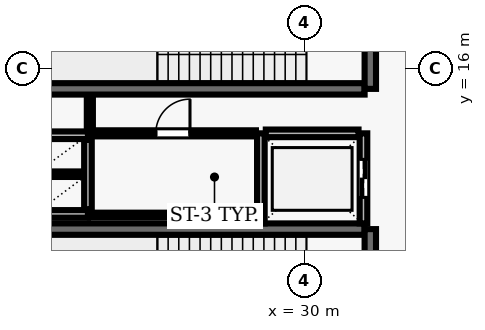
"""IFC4 building model, lengths in metres.
Left out: names, types, materials, properties, quantities, classifications, styles, units other than length and angle.
Written with IfcOpenShell. Run it as: python <this file> out.ifc"""

import sys

from ifc_helpers import new_model, si_unit, direction, frame, frame_2d, origin, place, context, subcontext, project, spatial, rectangle, extrude, element, fill, save


model = new_model("IFC4")
c1 = context("Model", 3, precision=1e-05, world=origin(), true_north=direction((0.0, 1.0)))
c2 = subcontext(c1, "Body", "Model", "MODEL_VIEW")
j1 = project(units=[si_unit("LENGTHUNIT", "METRE"), si_unit("PLANEANGLEUNIT", "RADIAN")], contexts=[c1])
p1 = place(None, origin())
s1 = spatial("IfcSite", under=j1, at=p1, CompositionType="ELEMENT")
p2 = place(p1, origin())
s2 = spatial("IfcBuilding", under=s1, at=p2, CompositionType="ELEMENT")
p3 = place(p2, origin())
s3 = spatial("IfcBuildingStorey", under=s2, at=p3, CompositionType="ELEMENT", Elevation=0.0)
p4 = place(p3, frame((23.22, 15.47, 0.0), z_axis=(0.0, 0.0, 1.0), x_axis=(1.0, 0.0, 0.0)))
e1 = element("IfcWall", 1, at=p4, inside=s3, PredefinedType="SHEAR", context=c2, shape_type="SweptSolid", body=[
    extrude(rectangle(XDim=8.36, YDim=0.3, at=frame_2d((4.18, 0.0))), origin(), (0.0, 0.0, 1.0), 4.92),
])
p5 = place(p3, frame((31.73, 15.47, 0.0), z_axis=(0.0, 0.0, 1.0), x_axis=(0.0, 1.0, 0.0)))
e2 = element("IfcWall", 2, at=p5, inside=s3, PredefinedType="SHEAR", context=c2, shape_type="SweptSolid", body=[
    extrude(rectangle(XDim=3.51, YDim=0.3, at=frame_2d((1.755, 0.0))), origin(), (0.0, 0.0, 1.0), 4.92),
])
p6 = place(p5, frame((1.18, 0.0, 0.0)))
e3 = element("IfcOpeningElement", 3, at=p6, cuts=e2, PredefinedType="OPENING", context=c2, shape_type="SweptSolid", body=[
    extrude(rectangle(XDim=1.15, YDim=2.15, at=frame_2d((0.575, 1.075))), frame((0.0, 0.16, 0.0), z_axis=(0.0, -1.0, 0.0), x_axis=(1.0, 0.0, 0.0)), (0.0, 0.0, 1.0), 0.32),
])
p7 = place(p3, frame((31.58, 11.78, 0.0), z_axis=(0.0, 0.0, 1.0), x_axis=(-1.0, 0.0, 0.0)))
e4 = element("IfcWall", 4, at=p7, inside=s3, PredefinedType="SHEAR", context=c2, shape_type="SweptSolid", body=[
    extrude(rectangle(XDim=8.36, YDim=0.3, at=frame_2d((4.18, 0.0))), origin(), (0.0, 0.0, 1.0), 4.92),
])
p8 = place(p3, frame((31.73, 8.27, 0.0), z_axis=(0.0, 0.0, 1.0), x_axis=(0.0, 1.0, 0.0)))
e5 = element("IfcWall", 5, at=p8, inside=s3, PredefinedType="SHEAR", context=c2, shape_type="SweptSolid", body=[
    extrude(rectangle(XDim=3.51, YDim=0.3, at=frame_2d((1.755, 0.0))), origin(), (0.0, 0.0, 1.0), 4.92),
])
p9 = place(p8, frame((1.18, 0.0, 0.0)))
e6 = element("IfcOpeningElement", 6, at=p9, cuts=e5, PredefinedType="OPENING", context=c2, shape_type="SweptSolid", body=[
    extrude(rectangle(XDim=1.15, YDim=2.15, at=frame_2d((0.575, 1.075))), frame((0.0, 0.16, 0.0), z_axis=(0.0, -1.0, 0.0), x_axis=(1.0, 0.0, 0.0)), (0.0, 0.0, 1.0), 0.32),
])
p10 = place(p3, frame((28.85, 14.3, 0.0), z_axis=(0.0, 0.0, 1.0), x_axis=(0.0, -1.0, 0.0)))
e7 = element("IfcWall", 7, at=p10, inside=s3, PredefinedType="SOLIDWALL", context=c2, shape_type="SweptSolid", body=[
    extrude(rectangle(XDim=2.37, YDim=0.2, at=frame_2d((1.185, 0.0))), origin(), (0.0, 0.0, 1.0), 4.92),
])
p11 = place(p3, frame((31.55, 11.93, 0.0), z_axis=(0.0, 0.0, 1.0), x_axis=(0.0, 1.0, 0.0)))
e8 = element("IfcWall", 8, at=p11, inside=s3, PredefinedType="SOLIDWALL", context=c2, shape_type="SweptSolid", body=[
    extrude(rectangle(XDim=2.37, YDim=0.2, at=frame_2d((1.185, 0.0))), origin(), (0.0, 0.0, 1.0), 4.92),
])
p12 = place(p11, frame((0.685, 0.0, 0.0)))
e9 = element("IfcOpeningElement", 9, at=p12, cuts=e8, PredefinedType="OPENING", context=c2, shape_type="SweptSolid", body=[
    extrude(rectangle(XDim=1.0, YDim=2.1, at=frame_2d((0.5, 1.05))), frame((0.0, 0.11, 0.0), z_axis=(0.0, -1.0, 0.0), x_axis=(1.0, 0.0, 0.0)), (0.0, 0.0, 1.0), 0.22),
])
p13 = place(p3, frame((31.42, 14.3, 0.0), z_axis=(0.0, 0.0, 1.0), x_axis=(-1.0, 0.0, 0.0)))
e10 = element("IfcWall", 10, at=p13, inside=s3, PredefinedType="SOLIDWALL", context=c2, shape_type="SweptSolid", body=[
    extrude(rectangle(XDim=2.44, YDim=0.2, at=frame_2d((1.22, 0.0))), origin(), (0.0, 0.0, 1.0), 4.92),
])
for number, where, z_axis, x_axis in (
    (11, (22.9, 14.25, 0.0), (0.0, 0.0, 1.0), (1.0, 0.0, 0.0)),
    (12, (22.9, 12.18, 0.0), (0.0, 0.0, 1.0), (1.0, 0.0, 0.0)),
):
    element("IfcWall", number, at=place(p3, frame(where, z_axis=z_axis, x_axis=x_axis)), inside=s3, PredefinedType="SOLIDWALL", context=c2, shape_type="SweptSolid", body=[
        extrude(rectangle(XDim=1.4, YDim=0.2, at=frame_2d((0.7, 0.0))), origin(), (0.0, 0.0, 1.0), 4.92),
    ])
p14 = place(p3, frame((24.3, 12.3, 0.0), z_axis=(0.0, 0.0, 1.0), x_axis=(0.0, 1.0, 0.0)))
e13 = element("IfcWall", 13, at=p14, inside=s3, PredefinedType="SOLIDWALL", context=c2, shape_type="SweptSolid", body=[
    extrude(rectangle(XDim=1.83, YDim=0.2, at=frame_2d((0.915, 0.0))), origin(), (0.0, 0.0, 1.0), 4.92),
])
p15 = place(p3, frame((23.01, 13.225, 0.0), z_axis=(0.0, 0.0, 1.0), x_axis=(1.0, 0.0, 0.0)))
e14 = element("IfcWall", 14, at=p15, inside=s3, PredefinedType="PARTITIONING", context=c2, shape_type="SweptSolid", body=[
    extrude(rectangle(XDim=1.18, YDim=0.145, at=frame_2d((0.59, 0.0))), origin(), (0.0, 0.0, 1.0), 4.92),
])
p16 = place(p3, frame((24.35, 12.15, 0.0), z_axis=(0.0, 0.0, 1.0), x_axis=(1.0, 0.0, 0.0)))
e15 = element("IfcWall", 15, at=p16, inside=s3, PredefinedType="PARTITIONING", context=c2, shape_type="SweptSolid", body=[
    extrude(rectangle(XDim=4.37, YDim=0.125, at=frame_2d((2.185, 0.0))), origin(), (0.0, 0.0, 1.0), 4.92),
])
p17 = place(p3, frame((24.35, 14.3, 0.0), z_axis=(0.0, 0.0, 1.0), x_axis=(1.0, 0.0, 0.0)))
e16 = element("IfcWall", 16, at=p17, inside=s3, PredefinedType="PARTITIONING", context=c2, shape_type="SweptSolid", body=[
    extrude(rectangle(XDim=4.37, YDim=0.16, at=frame_2d((2.185, 0.0))), origin(), (0.0, 0.0, 1.0), 4.92),
])
p18 = place(p17, frame((1.735, 0.0, 0.0)))
e17 = element("IfcOpeningElement", 17, at=p18, cuts=e16, PredefinedType="OPENING", context=c2, shape_type="SweptSolid", body=[
    extrude(rectangle(XDim=0.9, YDim=2.1, at=frame_2d((0.45, 1.05))), frame((0.0, 0.09, 0.0), z_axis=(0.0, -1.0, 0.0), x_axis=(1.0, 0.0, 0.0)), (0.0, 0.0, 1.0), 0.18),
])
p19 = place(p3, frame((24.35, 15.29, 0.0), z_axis=(0.0, 0.0, 1.0), x_axis=(0.0, -1.0, 0.0)))
e18 = element("IfcWall", 18, at=p19, inside=s3, PredefinedType="PARTITIONING", context=c2, shape_type="SweptSolid", body=[
    extrude(rectangle(XDim=0.915, YDim=0.16, at=frame_2d((0.458, 0.0))), origin(), (0.0, 0.0, 1.0), 4.92),
])
p20 = place(p12, origin())
e19 = element("IfcDoor", 19, at=p20, inside=s3, OperationType="DOUBLE_DOOR_SLIDING", PredefinedType="DOOR", context=c2, shape_type="SweptSolid", body=[
    extrude(rectangle(XDim=1.0, YDim=2.1, at=frame_2d((0.5, 1.05))), frame((0.0, 0.025, 0.0), z_axis=(0.0, -1.0, 0.0), x_axis=(1.0, 0.0, 0.0)), (0.0, 0.0, 1.0), 0.05),
])
fill(e9, e19)
p21 = place(p18, origin())
e20 = element("IfcDoor", 20, at=p21, inside=s3, OperationType="SINGLE_SWING_RIGHT", PredefinedType="DOOR", context=c2, shape_type="SweptSolid", body=[
    extrude(rectangle(XDim=0.9, YDim=2.1, at=frame_2d((0.45, 1.05))), frame((0.0, 0.025, 0.0), z_axis=(0.0, -1.0, 0.0), x_axis=(1.0, 0.0, 0.0)), (0.0, 0.0, 1.0), 0.05),
])
fill(e17, e20)
save(model, sys.argv[1])
